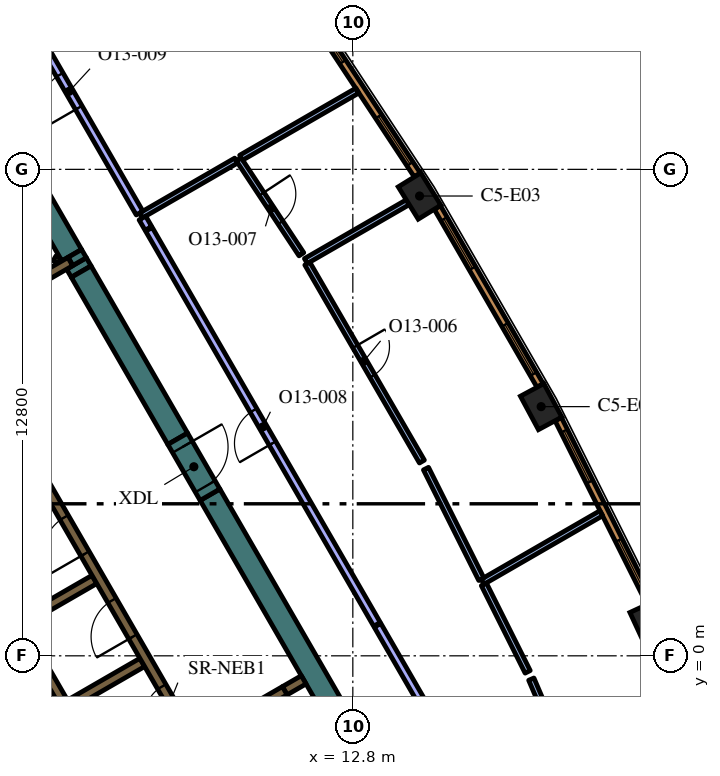
"""IFC4 building model, lengths in metres.
Left out: names, types, materials, properties, quantities, classifications, styles, units other than length and angle.
Written with IfcOpenShell. Run it as: python <this file> out.ifc"""

import sys

from ifc_helpers import new_model, si_unit, direction, frame, frame_2d, origin, origin_2d, place, context, subcontext, project, spatial, polyline, rectangle, outline, extrude, element, fill, save


model = new_model("IFC4")
c1 = context("Model", 3, precision=1e-05, world=origin(), true_north=direction((0.0, 1.0)))
c2 = subcontext(c1, "Body", "Model", "MODEL_VIEW")
j1 = project(units=[si_unit("LENGTHUNIT", "METRE"), si_unit("PLANEANGLEUNIT", "RADIAN")], contexts=[c1])
p1 = place(None, origin())
s1 = spatial("IfcSite", under=j1, at=p1, CompositionType="ELEMENT")
p2 = place(p1, origin())
s2 = spatial("IfcBuilding", under=s1, at=p2, CompositionType="ELEMENT")
p3 = place(p2, frame((0.0, 0.0, 296.4)))
s3 = spatial("IfcBuildingStorey", under=s2, at=p3, CompositionType="ELEMENT", Elevation=296.4)
for number, where, z_axis, x_axis in (
    (1, (20.619, 0.834, 0.0), (0.0, 0.0, 1.0), (-0.421, 0.907, 0.0)),
    (2, (17.756, 6.557, 0.0), (0.0, 0.0, 1.0), (-0.474, 0.881, 0.0)),
    (3, (14.556, 12.098, 0.0), (0.0, 0.0, 1.0), (-0.526, 0.851, 0.0)),
):
    element("IfcColumn", number, at=place(p3, frame(where, z_axis=z_axis, x_axis=x_axis)), inside=s3, PredefinedType="COLUMN", context=c2, shape_type="SweptSolid", body=[
        extrude(rectangle(XDim=1.0, YDim=0.7, at=origin_2d()), origin(), (0.0, 0.0, 1.0), 4.2),
    ])
p4 = place(p3, frame((9.042, 4.239, 0.0), z_axis=(0.0, 0.0, 1.0), x_axis=(0.500005785455, -0.866022063525, 0.0)))
e4 = element("IfcWall", 4, at=p4, inside=s3, PredefinedType="SOLIDWALL", context=c2, shape_type="SweptSolid", body=[
    extrude(rectangle(XDim=12.406, YDim=0.6, at=frame_2d((6.203, 0.0))), origin(), (0.0, 0.0, 1.0), 4.2),
])
p5 = place(p3, frame((5.529, 10.324, 0.0), z_axis=(0.0, 0.0, 1.0), x_axis=(0.499122205112, -0.866531606097, 0.0)))
e5 = element("IfcWall", 5, at=p5, inside=s3, PredefinedType="SOLIDWALL", context=c2, shape_type="SweptSolid", body=[
    extrude(rectangle(XDim=0.247, YDim=0.6, at=frame_2d((0.123, 0.0))), origin(), (0.0, 0.0, 1.0), 4.2),
])
p6 = place(p3, frame((1.989, 16.456, 0.0), z_axis=(0.0, 0.0, 1.0), x_axis=(0.499973159588, -0.866040899549, 0.0)))
e6 = element("IfcWall", 6, at=p6, inside=s3, PredefinedType="SOLIDWALL", context=c2, shape_type="SweptSolid", body=[
    extrude(rectangle(XDim=6.828, YDim=0.6, at=frame_2d((3.414, 0.0))), origin(), (0.0, 0.0, 1.0), 4.2),
])
p7 = place(p3, origin())
e7 = element("IfcWall", 7, at=p7, inside=s3, PredefinedType="SOLIDWALL", context=c2, shape_type="SweptSolid", body=[
    extrude(outline(polyline([(5.664, 10.691), (5.788, 10.476), (5.432, 10.271), (5.308, 10.486), (5.664, 10.691)])), origin(), (0.0, 0.0, 1.0), 4.2),
])
p8 = place(p3, frame((8.192, 5.711, 0.0), z_axis=(0.0, 0.0, 1.0), x_axis=(-0.500006836656, 0.866021456604, 0.0)))
e8 = element("IfcWall", 8, at=p8, inside=s3, PredefinedType="SOLIDWALL", context=c2, shape_type="SweptSolid", body=[
    extrude(rectangle(XDim=5.078, YDim=0.6, at=frame_2d((2.539, 0.0))), origin(), (0.0, 0.0, 1.0), 4.2),
])
p9 = place(p3, frame((11.507, -0.631, 0.0), z_axis=(0.0, 0.0, 1.0), x_axis=(-0.866093731455, -0.499881634324, 0.0)))
e9 = element("IfcWall", 9, at=p9, inside=s3, PredefinedType="SOLIDWALL", context=c2, shape_type="SweptSolid", body=[
    extrude(rectangle(XDim=0.575, YDim=0.25, at=frame_2d((0.288, 0.0))), origin(), (0.0, 0.0, 1.0), 4.2),
])
p10 = place(p3, frame((5.97, -2.591, 0.0), z_axis=(0.0, 0.0, 1.0), x_axis=(-0.499994469932, 0.866028596547, 0.0)))
e10 = element("IfcWall", 10, at=p10, inside=s3, PredefinedType="SOLIDWALL", context=c2, shape_type="SweptSolid", body=[
    extrude(rectangle(XDim=10.488, YDim=0.25, at=frame_2d((5.244, 0.0))), origin(), (0.0, 0.0, 1.0), 4.2),
])
for number, where, z_axis, x_axis in (
    (11, (4.094, 0.909, 0.0), (0.0, 0.0, 1.0), (0.866, 0.5, 0.0)),
    (12, (5.354, -1.274, 0.0), (0.0, 0.0, 1.0), (0.866, 0.5, 0.0)),
):
    element("IfcWall", number, at=place(p3, frame(where, z_axis=z_axis, x_axis=x_axis)), inside=s3, PredefinedType="SOLIDWALL", context=c2, shape_type="SweptSolid", body=[
        extrude(rectangle(XDim=2.2, YDim=0.25, at=frame_2d((1.1, 0.0))), origin(), (0.0, 0.0, 1.0), 4.2),
    ])
p11 = place(p3, frame((4.98, 10.358, 0.0), z_axis=(0.0, 0.0, 1.0), x_axis=(0.500640202437, 0.86565546709, 0.0)))
e13 = element("IfcWall", 13, at=p11, inside=s3, PredefinedType="PARTITIONING", context=c2, shape_type="SweptSolid", body=[
    extrude(rectangle(XDim=0.146, YDim=0.15, at=frame_2d((0.073, 0.0))), origin(), (0.0, 0.0, 1.0), 3.55),
])
p12 = place(p3, frame((8.565, -2.185, 0.0), z_axis=(0.0, 0.0, 1.0), x_axis=(-0.499997954832, 0.866026584559, 0.0)))
e14 = element("IfcWall", 14, at=p12, inside=s3, PredefinedType="SOLIDWALL", context=c2, shape_type="SweptSolid", body=[
    extrude(rectangle(XDim=12.35, YDim=0.25, at=frame_2d((6.175, 0.0))), origin(), (0.0, 0.0, 1.0), 4.2),
])
p13 = place(p12, frame((0.685, 0.0, 0.0)))
e15 = element("IfcOpeningElement", 15, at=p13, cuts=e14, PredefinedType="OPENING", context=c2, shape_type="SweptSolid", body=[
    extrude(rectangle(XDim=0.9, YDim=2.1, at=frame_2d((0.45, 1.05))), frame((0.0, 0.135, 0.0), z_axis=(0.0, -1.0, 0.0), x_axis=(1.0, 0.0, 0.0)), (0.0, 0.0, 1.0), 0.27),
])
p14 = place(p12, frame((3.105, 0.0, 0.0)))
e16 = element("IfcOpeningElement", 16, at=p14, cuts=e14, PredefinedType="OPENING", context=c2, shape_type="SweptSolid", body=[
    extrude(rectangle(XDim=1.1, YDim=2.1, at=frame_2d((0.55, 1.05))), frame((0.0, 0.135, 0.0), z_axis=(0.0, -1.0, 0.0), x_axis=(1.0, 0.0, 0.0)), (0.0, 0.0, 1.0), 0.27),
])
p15 = place(p12, frame((5.625, 0.0, 0.0)))
e17 = element("IfcOpeningElement", 17, at=p15, cuts=e14, PredefinedType="OPENING", context=c2, shape_type="SweptSolid", body=[
    extrude(rectangle(XDim=1.1, YDim=2.1, at=frame_2d((0.55, 1.05))), frame((0.0, 0.135, 0.0), z_axis=(0.0, -1.0, 0.0), x_axis=(1.0, 0.0, 0.0)), (0.0, 0.0, 1.0), 0.27),
])
p16 = place(p12, frame((8.145, 0.0, 0.0)))
e18 = element("IfcOpeningElement", 18, at=p16, cuts=e14, PredefinedType="OPENING", context=c2, shape_type="SweptSolid", body=[
    extrude(rectangle(XDim=1.1, YDim=2.1, at=frame_2d((0.55, 1.05))), frame((0.0, 0.135, 0.0), z_axis=(0.0, -1.0, 0.0), x_axis=(1.0, 0.0, 0.0)), (0.0, 0.0, 1.0), 0.27),
])
p17 = place(p12, frame((10.665, 0.0, 0.0)))
e19 = element("IfcOpeningElement", 19, at=p17, cuts=e14, PredefinedType="OPENING", context=c2, shape_type="SweptSolid", body=[
    extrude(rectangle(XDim=1.1, YDim=2.1, at=frame_2d((0.55, 1.05))), frame((0.0, 0.135, 0.0), z_axis=(0.0, -1.0, 0.0), x_axis=(1.0, 0.0, 0.0)), (0.0, 0.0, 1.0), 0.27),
])
p18 = place(p3, frame((5.366, 10.373, 0.0), z_axis=(0.0, 0.0, 1.0), x_axis=(-0.866019956843, -0.50000943426, 0.0)))
e20 = element("IfcWall", 20, at=p18, inside=s3, PredefinedType="SOLIDWALL", context=c2, shape_type="SweptSolid", body=[
    extrude(rectangle(XDim=2.7, YDim=0.25, at=frame_2d((1.35, 0.0))), origin(), (0.0, 0.0, 1.0), 4.2),
])
p19 = place(p18, frame((1.45, 0.0, 0.0)))
e21 = element("IfcOpeningElement", 21, at=p19, cuts=e20, PredefinedType="OPENING", context=c2, shape_type="SweptSolid", body=[
    extrude(rectangle(XDim=0.9, YDim=2.1, at=frame_2d((0.45, 1.05))), frame((0.0, 0.135, 0.0), z_axis=(0.0, -1.0, 0.0), x_axis=(1.0, 0.0, 0.0)), (0.0, 0.0, 1.0), 0.27),
])
p20 = place(p3, frame((11.009, -0.919, 0.0), z_axis=(0.0, 0.0, 1.0), x_axis=(-0.866059744384, -0.49994051562, 0.0)))
e22 = element("IfcWall", 22, at=p20, inside=s3, PredefinedType="SOLIDWALL", context=c2, shape_type="SweptSolid", body=[
    extrude(rectangle(XDim=2.1, YDim=0.25, at=frame_2d((1.05, 0.0))), origin(), (0.0, 0.0, 1.0), 4.2),
])
p21 = place(p20, frame((0.45, 0.0, 0.0)))
e23 = element("IfcOpeningElement", 23, at=p21, cuts=e22, PredefinedType="OPENING", context=c2, shape_type="SweptSolid", body=[
    extrude(rectangle(XDim=1.2, YDim=2.1, at=frame_2d((0.6, 1.05))), frame((0.0, 0.135, 0.0), z_axis=(0.0, -1.0, 0.0), x_axis=(1.0, 0.0, 0.0)), (0.0, 0.0, 1.0), 0.27),
])
p22 = place(p3, frame((8.192, 5.711, 0.0), z_axis=(0.0, 0.0, 1.0), x_axis=(0.500062241894, -0.865989465428, 0.0)))
e24 = element("IfcWall", 24, at=p22, inside=s3, PredefinedType="SOLIDWALL", context=c2, shape_type="SweptSolid", body=[
    extrude(rectangle(XDim=1.7, YDim=0.6, at=frame_2d((0.85, 0.0))), origin(), (0.0, 0.0, 1.0), 4.2),
])
p23 = place(p22, frame((0.25, 0.0, 0.0)))
e25 = element("IfcOpeningElement", 25, at=p23, cuts=e24, PredefinedType="OPENING", context=c2, shape_type="SweptSolid", body=[
    extrude(rectangle(XDim=1.2, YDim=2.1, at=frame_2d((0.6, 1.05))), frame((0.0, 0.31, 0.0), z_axis=(0.0, -1.0, 0.0), x_axis=(1.0, 0.0, 0.0)), (0.0, 0.0, 1.0), 0.62),
])
p24 = place(p3, frame((16.215, 1.948, 0.0), z_axis=(0.0, 0.0, 1.0), x_axis=(0.866026634742, 0.499997867913, 0.0)))
e26 = element("IfcWall", 26, at=p24, inside=s3, PredefinedType="PARTITIONING", context=c2, shape_type="SweptSolid", body=[
    extrude(rectangle(XDim=3.606, YDim=0.15, at=frame_2d((1.803, 0.0))), origin(), (0.0, 0.0, 1.0), 3.55),
])
p25 = place(p3, frame((17.497, -0.613, 0.0), z_axis=(0.0, 0.0, 1.0), x_axis=(0.393381340755, -0.919375397075, 0.0)))
e27 = element("IfcWall", 27, at=p25, inside=s3, PredefinedType="PARTITIONING", context=c2, shape_type="SweptSolid", body=[
    extrude(rectangle(XDim=5.368, YDim=0.15, at=frame_2d((2.684, 0.0))), origin(), (0.0, 0.0, 1.0), 3.55),
])
p26 = place(p25, frame((2.268, 0.0, 0.0)))
e28 = element("IfcOpeningElement", 28, at=p26, cuts=e27, PredefinedType="OPENING", context=c2, shape_type="SweptSolid", body=[
    extrude(rectangle(XDim=0.9, YDim=2.1, at=frame_2d((0.45, 1.05))), frame((0.0, 0.085, 0.0), z_axis=(0.0, -1.0, 0.0), x_axis=(1.0, 0.0, 0.0)), (0.0, 0.0, 1.0), 0.17),
])
p27 = place(p3, frame((17.401, -0.422, 0.0), z_axis=(0.0, 0.0, 1.0), x_axis=(-0.447479029466, 0.894294424778, 0.0)))
e29 = element("IfcWall", 29, at=p27, inside=s3, PredefinedType="PARTITIONING", context=c2, shape_type="SweptSolid", body=[
    extrude(rectangle(XDim=2.575, YDim=0.15, at=frame_2d((1.288, 0.0))), origin(), (0.0, 0.0, 1.0), 3.55),
])
p28 = place(p3, frame((11.564, 10.387, 0.0), z_axis=(0.0, 0.0, 1.0), x_axis=(0.86604641216, 0.499963610661, 0.0)))
e30 = element("IfcWall", 30, at=p28, inside=s3, PredefinedType="PARTITIONING", context=c2, shape_type="SweptSolid", body=[
    extrude(rectangle(XDim=3.096, YDim=0.15, at=frame_2d((1.548, 0.0))), origin(), (0.0, 0.0, 1.0), 3.55),
])
p29 = place(p3, frame((16.181, 2.015, 0.0), z_axis=(0.0, 0.0, 1.0), x_axis=(-0.447513663313, 0.894277094165, 0.0)))
e31 = element("IfcWall", 31, at=p29, inside=s3, PredefinedType="PARTITIONING", context=c2, shape_type="SweptSolid", body=[
    extrude(rectangle(XDim=3.254, YDim=0.15, at=frame_2d((1.627, 0.0))), origin(), (0.0, 0.0, 1.0), 3.55),
])
p30 = place(p3, frame((11.602, 10.322, 0.0), z_axis=(0.0, 0.0, 1.0), x_axis=(0.500961140821, -0.865469777281, 0.0)))
e32 = element("IfcWall", 32, at=p30, inside=s3, PredefinedType="PARTITIONING", context=c2, shape_type="SweptSolid", body=[
    extrude(rectangle(XDim=6.021, YDim=0.15, at=frame_2d((3.01, 0.0))), origin(), (0.0, 0.0, 1.0), 3.55),
])
p31 = place(p30, frame((2.521, 0.0, 0.0)))
e33 = element("IfcOpeningElement", 33, at=p31, cuts=e32, PredefinedType="OPENING", context=c2, shape_type="SweptSolid", body=[
    extrude(rectangle(XDim=0.9, YDim=2.1, at=frame_2d((0.45, 1.05))), frame((0.0, 0.085, 0.0), z_axis=(0.0, -1.0, 0.0), x_axis=(1.0, 0.0, 0.0)), (0.0, 0.0, 1.0), 0.17),
])
p32 = place(p3, frame((9.795, 13.068, 0.0), z_axis=(0.0, 0.0, 1.0), x_axis=(0.550767347659, -0.834658809786, 0.0)))
e34 = element("IfcWall", 34, at=p32, inside=s3, PredefinedType="PARTITIONING", context=c2, shape_type="SweptSolid", body=[
    extrude(rectangle(XDim=2.999, YDim=0.15, at=frame_2d((1.5, 0.0))), origin(), (0.0, 0.0, 1.0), 3.55),
])
p33 = place(p32, frame((1.099, 0.0, 0.0)))
e35 = element("IfcOpeningElement", 35, at=p33, cuts=e34, PredefinedType="OPENING", context=c2, shape_type="SweptSolid", body=[
    extrude(rectangle(XDim=0.9, YDim=2.1, at=frame_2d((0.45, 1.05))), frame((0.0, 0.085, 0.0), z_axis=(0.0, -1.0, 0.0), x_axis=(1.0, 0.0, 0.0)), (0.0, 0.0, 1.0), 0.17),
])
p34 = place(p3, frame((9.86, 13.106, 0.0), z_axis=(0.0, 0.0, 1.0), x_axis=(0.866022094817, 0.500005731256, 0.0)))
e36 = element("IfcWall", 36, at=p34, inside=s3, PredefinedType="PARTITIONING", context=c2, shape_type="SweptSolid", body=[
    extrude(rectangle(XDim=3.531, YDim=0.15, at=frame_2d((1.766, 0.0))), origin(), (0.0, 0.0, 1.0), 3.55),
])
p35 = place(p3, frame((7.226, 11.585, 0.0), z_axis=(0.0, 0.0, 1.0), x_axis=(0.866021079084, 0.500007490527, 0.0)))
e37 = element("IfcWall", 37, at=p35, inside=s3, PredefinedType="PARTITIONING", context=c2, shape_type="SweptSolid", body=[
    extrude(rectangle(XDim=2.892, YDim=0.15, at=frame_2d((1.446, 0.0))), origin(), (0.0, 0.0, 1.0), 3.55),
])
p36 = place(p3, frame((13.436, 0.829, 0.0), z_axis=(0.0, 0.0, 1.0), x_axis=(-0.49999894854, 0.866026010844, 0.0)))
e38 = element("IfcWall", 38, at=p36, inside=s3, PredefinedType="PARTITIONING", context=c2, shape_type="SweptSolid", body=[
    extrude(rectangle(XDim=12.0, YDim=0.2, at=frame_2d((6.0, 0.0))), origin(), (0.0, 0.0, 1.0), 3.55),
])
p37 = place(p36, frame((5.5, 0.0, 0.0)))
e39 = element("IfcOpeningElement", 39, at=p37, cuts=e38, PredefinedType="OPENING", context=c2, shape_type="SweptSolid", body=[
    extrude(rectangle(XDim=1.0, YDim=2.1, at=frame_2d((0.5, 1.05))), frame((0.0, 0.11, 0.0), z_axis=(0.0, -1.0, 0.0), x_axis=(1.0, 0.0, 0.0)), (0.0, 0.0, 1.0), 0.22),
])
p38 = place(p3, frame((7.421, 11.247, 0.0), z_axis=(0.0, 0.0, 1.0), x_axis=(-0.500303403544, 0.865850162789, 0.0)))
e40 = element("IfcWall", 40, at=p38, inside=s3, PredefinedType="PARTITIONING", context=c2, shape_type="SweptSolid", body=[
    extrude(rectangle(XDim=0.315, YDim=0.2, at=frame_2d((0.158, 0.0))), origin(), (0.0, 0.0, 1.0), 3.55),
])
p39 = place(p3, frame((17.565, -6.324, 0.0), z_axis=(0.0, 0.0, 1.0), x_axis=(-0.499977548053, 0.866038366034, 0.0)))
e41 = element("IfcWall", 41, at=p39, inside=s3, PredefinedType="PARTITIONING", context=c2, shape_type="SweptSolid", body=[
    extrude(rectangle(XDim=8.229, YDim=0.2, at=frame_2d((4.115, 0.0))), origin(), (0.0, 0.0, 1.0), 3.55),
])
p40 = place(p3, frame((7.188, 11.65, 0.0), z_axis=(0.0, 0.0, 1.0), x_axis=(-0.499989634868, 0.866031388014, 0.0)))
e42 = element("IfcWall", 42, at=p40, inside=s3, PredefinedType="PARTITIONING", context=c2, shape_type="SweptSolid", body=[
    extrude(rectangle(XDim=7.303, YDim=0.2, at=frame_2d((3.652, 0.0))), origin(), (0.0, 0.0, 1.0), 3.55),
])
p41 = place(p40, frame((3.2, 0.0, 0.0)))
e43 = element("IfcOpeningElement", 43, at=p41, cuts=e42, PredefinedType="OPENING", context=c2, shape_type="SweptSolid", body=[
    extrude(rectangle(XDim=1.0, YDim=2.1, at=frame_2d((0.5, 1.05))), frame((0.0, 0.11, 0.0), z_axis=(0.0, -1.0, 0.0), x_axis=(1.0, 0.0, 0.0)), (0.0, 0.0, 1.0), 0.22),
])
p42 = place(p3, frame((20.625, 1.392, 0.0), z_axis=(0.0, 0.0, 1.0), x_axis=(-0.447484531401, 0.894291671747, 0.0)))
e44 = element("IfcWall", 44, at=p42, inside=s3, PredefinedType="SOLIDWALL", context=c2, shape_type="SweptSolid", body=[
    extrude(rectangle(XDim=5.406, YDim=0.19, at=frame_2d((2.703, 0.0))), origin(), (0.0, 0.0, 1.0), 3.95),
])
p43 = place(p42, frame((0.346, 0.0, 0.6)))
e45 = element("IfcOpeningElement", 45, at=p43, cuts=e44, PredefinedType="OPENING", context=c2, shape_type="SweptSolid", body=[
    extrude(rectangle(XDim=1.5, YDim=2.85, at=frame_2d((0.75, 1.425))), frame((0.0, 0.105, 0.0), z_axis=(0.0, -1.0, 0.0), x_axis=(1.0, 0.0, 0.0)), (0.0, 0.0, 1.0), 0.21),
])
p44 = place(p42, frame((3.559, 0.0, 0.6)))
e46 = element("IfcOpeningElement", 46, at=p44, cuts=e44, PredefinedType="OPENING", context=c2, shape_type="SweptSolid", body=[
    extrude(rectangle(XDim=1.5, YDim=2.85, at=frame_2d((0.75, 1.425))), frame((0.0, 0.105, 0.0), z_axis=(0.0, -1.0, 0.0), x_axis=(1.0, 0.0, 0.0)), (0.0, 0.0, 1.0), 0.21),
])
p45 = place(p3, frame((17.728, 7.114, 0.0), z_axis=(0.0, 0.0, 1.0), x_axis=(-0.500024767483, 0.866011103799, 0.0)))
e47 = element("IfcWall", 47, at=p45, inside=s3, PredefinedType="SOLIDWALL", context=c2, shape_type="SweptSolid", body=[
    extrude(rectangle(XDim=5.406, YDim=0.19, at=frame_2d((2.703, 0.0))), origin(), (0.0, 0.0, 1.0), 3.95),
])
p46 = place(p45, frame((0.346, 0.0, 0.6)))
e48 = element("IfcOpeningElement", 48, at=p46, cuts=e47, PredefinedType="OPENING", context=c2, shape_type="SweptSolid", body=[
    extrude(rectangle(XDim=1.5, YDim=2.85, at=frame_2d((0.75, 1.425))), frame((0.0, 0.105, 0.0), z_axis=(0.0, -1.0, 0.0), x_axis=(1.0, 0.0, 0.0)), (0.0, 0.0, 1.0), 0.21),
])
p47 = place(p45, frame((3.56, 0.0, 0.6)))
e49 = element("IfcOpeningElement", 49, at=p47, cuts=e47, PredefinedType="OPENING", context=c2, shape_type="SweptSolid", body=[
    extrude(rectangle(XDim=1.5, YDim=2.85, at=frame_2d((0.75, 1.425))), frame((0.0, 0.105, 0.0), z_axis=(0.0, -1.0, 0.0), x_axis=(1.0, 0.0, 0.0)), (0.0, 0.0, 1.0), 0.21),
])
p48 = place(p3, frame((14.496, 12.653, 0.0), z_axis=(0.0, 0.0, 1.0), x_axis=(-0.550744054781, 0.83467417962, 0.0)))
e50 = element("IfcWall", 50, at=p48, inside=s3, PredefinedType="SOLIDWALL", context=c2, shape_type="SweptSolid", body=[
    extrude(rectangle(XDim=5.406, YDim=0.19, at=frame_2d((2.703, 0.0))), origin(), (0.0, 0.0, 1.0), 3.95),
])
p49 = place(p48, frame((0.346, 0.0, 0.6)))
e51 = element("IfcOpeningElement", 51, at=p49, cuts=e50, PredefinedType="OPENING", context=c2, shape_type="SweptSolid", body=[
    extrude(rectangle(XDim=1.5, YDim=2.85, at=frame_2d((0.75, 1.425))), frame((0.0, 0.105, 0.0), z_axis=(0.0, -1.0, 0.0), x_axis=(1.0, 0.0, 0.0)), (0.0, 0.0, 1.0), 0.21),
])
p50 = place(p48, frame((3.559, 0.0, 0.6)))
e52 = element("IfcOpeningElement", 52, at=p50, cuts=e50, PredefinedType="OPENING", context=c2, shape_type="SweptSolid", body=[
    extrude(rectangle(XDim=1.5, YDim=2.85, at=frame_2d((0.75, 1.425))), frame((0.0, 0.105, 0.0), z_axis=(0.0, -1.0, 0.0), x_axis=(1.0, 0.0, 0.0)), (0.0, 0.0, 1.0), 0.21),
])
p51 = place(p13, origin())
e53 = element("IfcDoor", 53, at=p51, inside=s3, OperationType="SINGLE_SWING_LEFT", PredefinedType="DOOR", context=c2, shape_type="SweptSolid", body=[
    extrude(rectangle(XDim=0.9, YDim=2.1, at=frame_2d((0.45, 1.05))), frame((0.0, 0.025, 0.0), z_axis=(0.0, -1.0, 0.0), x_axis=(1.0, 0.0, 0.0)), (0.0, 0.0, 1.0), 0.05),
])
fill(e15, e53)
p52 = place(p14, origin())
e54 = element("IfcDoor", 54, at=p52, inside=s3, OperationType="DOUBLE_DOOR_SLIDING", PredefinedType="DOOR", context=c2, shape_type="SweptSolid", body=[
    extrude(rectangle(XDim=1.1, YDim=2.1, at=frame_2d((0.55, 1.05))), frame((0.0, 0.025, 0.0), z_axis=(0.0, -1.0, 0.0), x_axis=(1.0, 0.0, 0.0)), (0.0, 0.0, 1.0), 0.05),
])
fill(e16, e54)
p53 = place(p15, origin())
e55 = element("IfcDoor", 55, at=p53, inside=s3, OperationType="DOUBLE_DOOR_SLIDING", PredefinedType="DOOR", context=c2, shape_type="SweptSolid", body=[
    extrude(rectangle(XDim=1.1, YDim=2.1, at=frame_2d((0.55, 1.05))), frame((0.0, 0.025, 0.0), z_axis=(0.0, -1.0, 0.0), x_axis=(1.0, 0.0, 0.0)), (0.0, 0.0, 1.0), 0.05),
])
fill(e17, e55)
p54 = place(p23, origin())
e56 = element("IfcDoor", 56, at=p54, inside=s3, OperationType="SINGLE_SWING_LEFT", PredefinedType="DOOR", context=c2, shape_type="SweptSolid", body=[
    extrude(rectangle(XDim=1.2, YDim=2.1, at=frame_2d((0.6, 1.05))), frame((0.0, 0.025, 0.0), z_axis=(0.0, -1.0, 0.0), x_axis=(1.0, 0.0, 0.0)), (0.0, 0.0, 1.0), 0.05),
])
fill(e25, e56)
p55 = place(p31, origin())
e57 = element("IfcDoor", 57, at=p55, inside=s3, OperationType="SINGLE_SWING_LEFT", PredefinedType="DOOR", context=c2, shape_type="SweptSolid", body=[
    extrude(rectangle(XDim=0.9, YDim=2.1, at=frame_2d((0.45, 1.05))), frame((0.0, 0.025, 0.0), z_axis=(0.0, -1.0, 0.0), x_axis=(1.0, 0.0, 0.0)), (0.0, 0.0, 1.0), 0.05),
])
fill(e33, e57)
p56 = place(p33, origin())
e58 = element("IfcDoor", 58, at=p56, inside=s3, OperationType="SINGLE_SWING_RIGHT", PredefinedType="DOOR", context=c2, shape_type="SweptSolid", body=[
    extrude(rectangle(XDim=0.9, YDim=2.1, at=frame_2d((0.45, 1.05))), frame((0.0, 0.025, 0.0), z_axis=(0.0, -1.0, 0.0), x_axis=(1.0, 0.0, 0.0)), (0.0, 0.0, 1.0), 0.05),
])
fill(e35, e58)
p57 = place(p37, origin())
e59 = element("IfcDoor", 59, at=p57, inside=s3, OperationType="SINGLE_SWING_RIGHT", PredefinedType="DOOR", context=c2, shape_type="SweptSolid", body=[
    extrude(rectangle(XDim=1.0, YDim=2.1, at=frame_2d((0.5, 1.05))), frame((0.0, 0.025, 0.0), z_axis=(0.0, -1.0, 0.0), x_axis=(1.0, 0.0, 0.0)), (0.0, 0.0, 1.0), 0.05),
])
fill(e39, e59)
p58 = place(p41, origin())
e60 = element("IfcDoor", 60, at=p58, inside=s3, OperationType="SINGLE_SWING_RIGHT", PredefinedType="DOOR", context=c2, shape_type="SweptSolid", body=[
    extrude(rectangle(XDim=1.0, YDim=2.1, at=frame_2d((0.5, 1.05))), frame((0.0, 0.025, 0.0), z_axis=(0.0, -1.0, 0.0), x_axis=(1.0, 0.0, 0.0)), (0.0, 0.0, 1.0), 0.05),
])
fill(e43, e60)
p59 = place(p43, origin())
e61 = element("IfcWindow", 61, at=p59, inside=s3, PartitioningType="SINGLE_PANEL", PredefinedType="WINDOW", context=c2, shape_type="SweptSolid", body=[
    extrude(rectangle(XDim=1.5, YDim=2.85, at=frame_2d((0.75, 1.425))), frame((0.0, 0.045, 0.0), z_axis=(0.0, -1.0, 0.0), x_axis=(1.0, 0.0, 0.0)), (0.0, 0.0, 1.0), 0.06),
])
fill(e45, e61)
p60 = place(p44, origin())
e62 = element("IfcWindow", 62, at=p60, inside=s3, PartitioningType="SINGLE_PANEL", PredefinedType="WINDOW", context=c2, shape_type="SweptSolid", body=[
    extrude(rectangle(XDim=1.5, YDim=2.85, at=frame_2d((0.75, 1.425))), frame((0.0, 0.045, 0.0), z_axis=(0.0, -1.0, 0.0), x_axis=(1.0, 0.0, 0.0)), (0.0, 0.0, 1.0), 0.06),
])
fill(e46, e62)
p61 = place(p46, origin())
e63 = element("IfcWindow", 63, at=p61, inside=s3, PartitioningType="SINGLE_PANEL", PredefinedType="WINDOW", context=c2, shape_type="SweptSolid", body=[
    extrude(rectangle(XDim=1.5, YDim=2.85, at=frame_2d((0.75, 1.425))), frame((0.0, 0.045, 0.0), z_axis=(0.0, -1.0, 0.0), x_axis=(1.0, 0.0, 0.0)), (0.0, 0.0, 1.0), 0.06),
])
fill(e48, e63)
p62 = place(p47, origin())
e64 = element("IfcWindow", 64, at=p62, inside=s3, PartitioningType="SINGLE_PANEL", PredefinedType="WINDOW", context=c2, shape_type="SweptSolid", body=[
    extrude(rectangle(XDim=1.5, YDim=2.85, at=frame_2d((0.75, 1.425))), frame((0.0, 0.045, 0.0), z_axis=(0.0, -1.0, 0.0), x_axis=(1.0, 0.0, 0.0)), (0.0, 0.0, 1.0), 0.06),
])
fill(e49, e64)
p63 = place(p49, origin())
e65 = element("IfcWindow", 65, at=p63, inside=s3, PartitioningType="SINGLE_PANEL", PredefinedType="WINDOW", context=c2, shape_type="SweptSolid", body=[
    extrude(rectangle(XDim=1.5, YDim=2.85, at=frame_2d((0.75, 1.425))), frame((0.0, 0.045, 0.0), z_axis=(0.0, -1.0, 0.0), x_axis=(1.0, 0.0, 0.0)), (0.0, 0.0, 1.0), 0.06),
])
fill(e51, e65)
p64 = place(p50, origin())
e66 = element("IfcWindow", 66, at=p64, inside=s3, PartitioningType="SINGLE_PANEL", PredefinedType="WINDOW", context=c2, shape_type="SweptSolid", body=[
    extrude(rectangle(XDim=1.5, YDim=2.85, at=frame_2d((0.75, 1.425))), frame((0.0, 0.045, 0.0), z_axis=(0.0, -1.0, 0.0), x_axis=(1.0, 0.0, 0.0)), (0.0, 0.0, 1.0), 0.06),
])
fill(e52, e66)
save(model, sys.argv[1])
